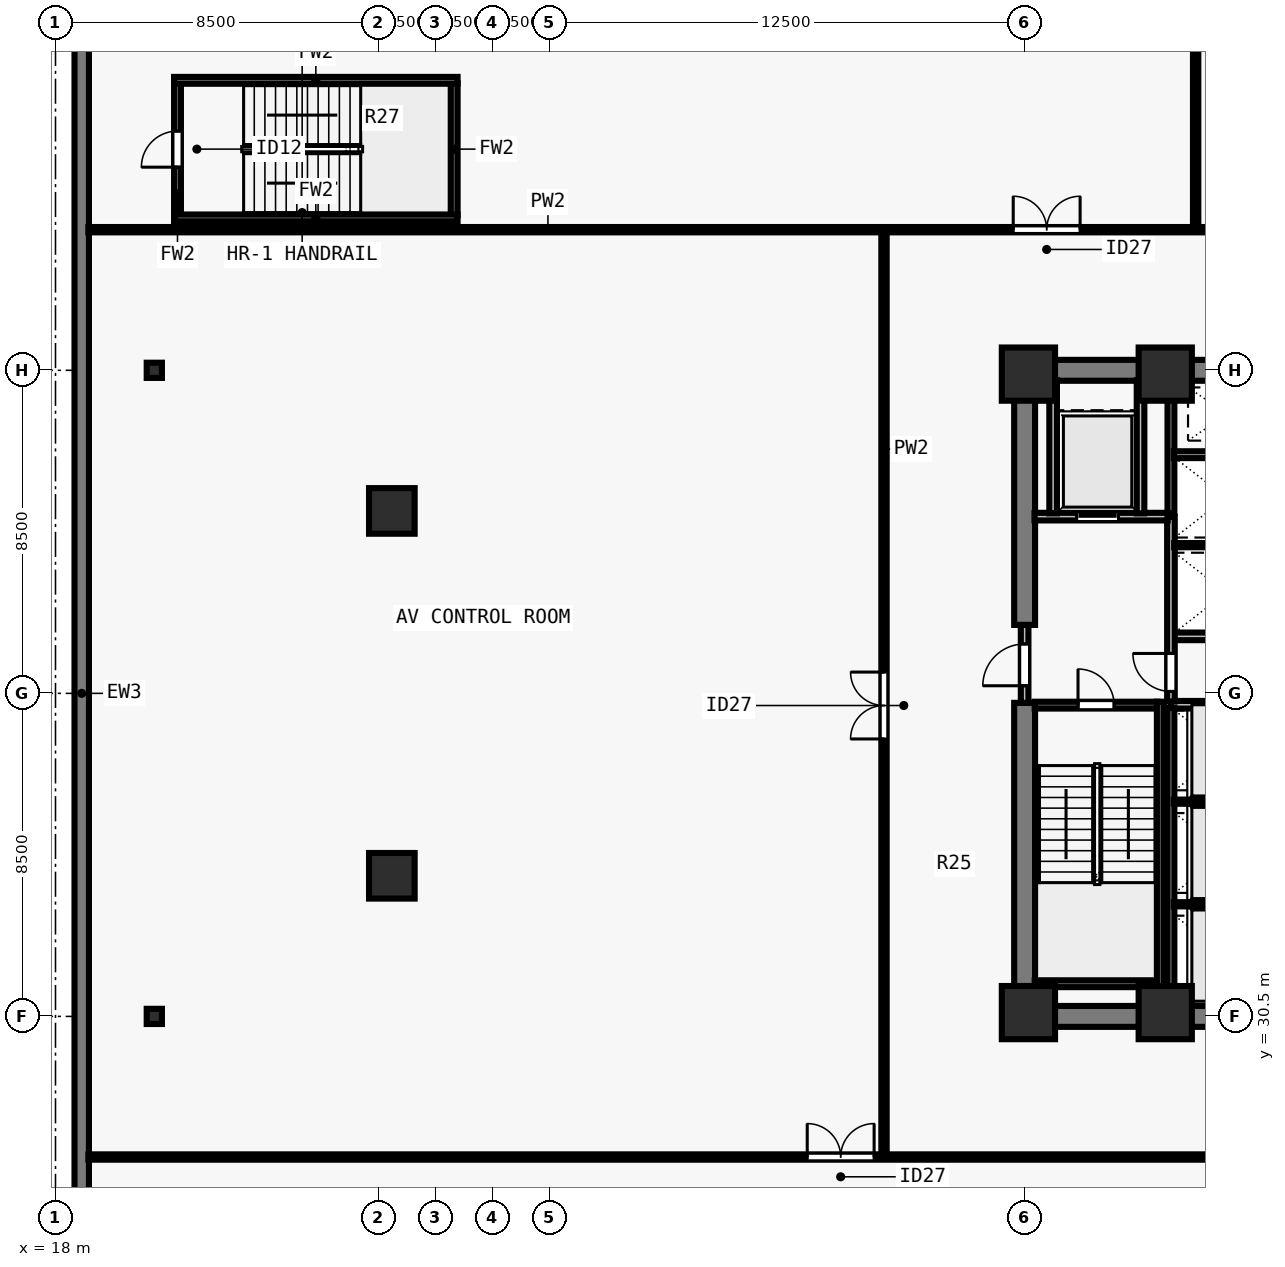
"""IFC4 building model, lengths in metres.
Left out: names, types, materials, properties, quantities, classifications, styles, units other than length and angle.
Written with IfcOpenShell. Run it as: python <this file> out.ifc"""

import sys

from ifc_helpers import new_model, si_unit, direction, frame, frame_2d, origin, origin_2d, place, context, subcontext, project, spatial, rectangle, i_section, extrude, element, fill, save


model = new_model("IFC4")
c1 = context("Model", 3, precision=1e-05, world=origin(), true_north=direction((0.0, 1.0)))
c2 = subcontext(c1, "Body", "Model", "MODEL_VIEW")
j1 = project(units=[si_unit("LENGTHUNIT", "METRE"), si_unit("PLANEANGLEUNIT", "RADIAN")], contexts=[c1])
p1 = place(None, origin())
s1 = spatial("IfcSite", under=j1, at=p1, CompositionType="ELEMENT")
p2 = place(p1, origin())
s2 = spatial("IfcBuilding", under=s1, at=p2, CompositionType="ELEMENT")
p3 = place(p2, frame((0.0, 0.0, 10.0)))
s3 = spatial("IfcBuildingStorey", under=s2, at=p3, CompositionType="ELEMENT", Elevation=10.0)
for number, where, z_axis, x_axis in (
    (1, (43.6, 30.6, 0.0), (0.0, 0.0, 1.0), (1.0, 0.0, 0.0)),
    (2, (47.2, 30.6, 0.0), (0.0, 0.0, 1.0), (1.0, 0.0, 0.0)),
    (3, (43.6, 47.4, 0.0), (0.0, 0.0, 1.0), (1.0, 0.0, 0.0)),
    (4, (47.2, 47.4, 0.0), (0.0, 0.0, 1.0), (1.0, 0.0, 0.0)),
):
    element("IfcColumn", number, at=place(p3, frame(where, z_axis=z_axis, x_axis=x_axis)), inside=s3, PredefinedType="COLUMN", context=c2, shape_type="SweptSolid", body=[
        extrude(rectangle(XDim=1.4, YDim=1.4, at=origin_2d()), origin(), (0.0, 0.0, 1.0), 4.5),
    ])
for number, where, z_axis, x_axis in (
    (5, (26.85, 43.8, 0.0), (0.0, 0.0, 1.0), (1.0, 0.0, 0.0)),
    (6, (26.85, 34.2, 0.0), (0.0, 0.0, 1.0), (1.0, 0.0, 0.0)),
):
    element("IfcColumn", number, at=place(p3, frame(where, z_axis=z_axis, x_axis=x_axis)), inside=s3, PredefinedType="COLUMN", context=c2, shape_type="SweptSolid", body=[
        extrude(rectangle(XDim=1.2, YDim=1.2, at=origin_2d()), origin(), (0.0, 0.0, 1.0), 4.5),
    ])
for number, where, z_axis, x_axis in (
    (7, (20.6, 30.5, 0.0), (0.0, 0.0, 1.0), (1.0, 0.0, 0.0)),
    (8, (20.6, 47.5, 0.0), (0.0, 0.0, 1.0), (1.0, 0.0, 0.0)),
):
    element("IfcColumn", number, at=place(p3, frame(where, z_axis=z_axis, x_axis=x_axis)), inside=s3, PredefinedType="COLUMN", context=c2, shape_type="SweptSolid", body=[
        extrude(i_section(OverallWidth=0.4, OverallDepth=0.4, WebThickness=0.028, FlangeThickness=0.045, at=origin_2d()), origin(), (0.0, 0.0, 1.0), 4.5),
    ])
p4 = place(p3, frame((18.69, 12.365, 0.0), z_axis=(0.0, 0.0, 1.0), x_axis=(0.0, 1.0, 0.0)))
e9 = element("IfcWall", 9, at=p4, inside=s3, PredefinedType="SOLIDWALL", context=c2, shape_type="SweptSolid", body=[
    extrude(rectangle(XDim=53.27, YDim=0.38, at=frame_2d((26.635, 0.0))), origin(), (0.0, 0.0, 1.0), 4.22),
])
for number, where, z_axis, x_axis in (
    (10, (43.225, 30.5, 0.0), (0.0, 0.0, 1.0), (1.0, 0.0, 0.0)),
    (11, (43.225, 47.5, 0.0), (0.0, 0.0, 1.0), (1.0, 0.0, 0.0)),
):
    element("IfcWall", number, at=place(p3, frame(where, z_axis=z_axis, x_axis=x_axis)), inside=s3, PredefinedType="SHEAR", context=c2, shape_type="SweptSolid", body=[
        extrude(rectangle(XDim=17.55, YDim=0.55, at=frame_2d((8.775, 0.0))), origin(), (0.0, 0.0, 1.0), 4.22),
    ])
p5 = place(p3, frame((43.5, 30.765, 0.0), z_axis=(0.0, 0.0, 1.0), x_axis=(0.0, 1.0, 0.0)))
e12 = element("IfcWall", 12, at=p5, inside=s3, PredefinedType="SHEAR", context=c2, shape_type="SweptSolid", body=[
    extrude(rectangle(XDim=7.985, YDim=0.55, at=frame_2d((3.993, 0.0))), origin(), (0.0, 0.0, 1.0), 4.22),
])
p6 = place(p3, frame((43.5, 40.8, 0.0), z_axis=(0.0, 0.0, 1.0), x_axis=(0.0, 1.0, 0.0)))
e13 = element("IfcWall", 13, at=p6, inside=s3, PredefinedType="SHEAR", context=c2, shape_type="SweptSolid", body=[
    extrude(rectangle(XDim=6.435, YDim=0.55, at=frame_2d((3.218, 0.0))), origin(), (0.0, 0.0, 1.0), 4.22),
])
for number, where, z_axis, x_axis in (
    (14, (47.35, 38.7, 0.0), (0.0, 0.0, 1.0), (1.0, 0.0, 0.0)),
    (15, (47.35, 40.5, 0.0), (0.0, 0.0, 1.0), (1.0, 0.0, 0.0)),
):
    element("IfcWall", number, at=place(p3, frame(where, z_axis=z_axis, x_axis=x_axis)), inside=s3, PredefinedType="SOLIDWALL", context=c2, shape_type="SweptSolid", body=[
        extrude(rectangle(XDim=2.95, YDim=0.2, at=frame_2d((1.475, 0.0))), origin(), (0.0, 0.0, 1.0), 4.22),
    ])
p7 = place(p3, frame((43.5, 38.75, 0.0), z_axis=(0.0, 0.0, 1.0), x_axis=(0.0, 1.0, 0.0)))
e16 = element("IfcWall", 16, at=p7, inside=s3, PredefinedType="SOLIDWALL", context=c2, shape_type="SweptSolid", body=[
    extrude(rectangle(XDim=2.05, YDim=0.2, at=frame_2d((1.025, 0.0))), origin(), (0.0, 0.0, 1.0), 4.22),
])
p8 = place(p7, frame((0.45, 0.0, 0.0)))
e17 = element("IfcOpeningElement", 17, at=p8, cuts=e16, PredefinedType="OPENING", context=c2, shape_type="SweptSolid", body=[
    extrude(rectangle(XDim=1.1, YDim=2.15, at=frame_2d((0.55, 1.075))), frame((0.0, 0.11, 0.0), z_axis=(0.0, -1.0, 0.0), x_axis=(1.0, 0.0, 0.0)), (0.0, 0.0, 1.0), 0.22),
])
p9 = place(p3, frame((47.35, 38.785, 0.0), z_axis=(0.0, 0.0, 1.0), x_axis=(0.0, 1.0, 0.0)))
e18 = element("IfcWall", 18, at=p9, inside=s3, PredefinedType="SOLIDWALL", context=c2, shape_type="SweptSolid", body=[
    extrude(rectangle(XDim=4.865, YDim=0.2, at=frame_2d((2.433, 0.0))), origin(), (0.0, 0.0, 1.0), 4.22),
])
p10 = place(p9, frame((0.265, 0.0, 0.0)))
e19 = element("IfcOpeningElement", 19, at=p10, cuts=e18, PredefinedType="OPENING", context=c2, shape_type="SweptSolid", body=[
    extrude(rectangle(XDim=1.0, YDim=2.15, at=frame_2d((0.5, 1.075))), frame((0.0, 0.11, 0.0), z_axis=(0.0, -1.0, 0.0), x_axis=(1.0, 0.0, 0.0)), (0.0, 0.0, 1.0), 0.22),
])
p11 = place(p3, frame((43.76, 43.65, 0.0), z_axis=(0.0, 0.0, 1.0), x_axis=(1.0, 0.0, 0.0)))
e20 = element("IfcWall", 20, at=p11, inside=s3, PredefinedType="SOLIDWALL", context=c2, shape_type="SweptSolid", body=[
    extrude(rectangle(XDim=3.505, YDim=0.2, at=frame_2d((1.752, 0.0))), origin(), (0.0, 0.0, 1.0), 4.22),
])
p12 = place(p11, frame((1.11, 0.0, 0.0)))
e21 = element("IfcOpeningElement", 21, at=p12, cuts=e20, PredefinedType="OPENING", context=c2, shape_type="SweptSolid", body=[
    extrude(rectangle(XDim=1.1, YDim=2.2, at=frame_2d((0.55, 1.1))), frame((0.0, 0.11, 0.0), z_axis=(0.0, -1.0, 0.0), x_axis=(1.0, 0.0, 0.0)), (0.0, 0.0, 1.0), 0.22),
])
for number, where, z_axis, x_axis in (
    (22, (46.55, 43.735, 0.0), (0.0, 0.0, 1.0), (0.0, 1.0, 0.0)),
    (23, (44.25, 43.735, 0.0), (0.0, 0.0, 1.0), (0.0, 1.0, 0.0)),
):
    element("IfcWall", number, at=place(p3, frame(where, z_axis=z_axis, x_axis=x_axis)), inside=s3, PredefinedType="SOLIDWALL", context=c2, shape_type="SweptSolid", body=[
        extrude(rectangle(XDim=3.505, YDim=0.2, at=frame_2d((1.752, 0.0))), origin(), (0.0, 0.0, 1.0), 4.22),
    ])
p13 = place(p3, frame((47.35, 30.76, 0.0), z_axis=(0.0, 0.0, 1.0), x_axis=(0.0, 1.0, 0.0)))
e24 = element("IfcWall", 24, at=p13, inside=s3, PredefinedType="SOLIDWALL", context=c2, shape_type="SweptSolid", body=[
    extrude(rectangle(XDim=7.855, YDim=0.18, at=frame_2d((3.927, 0.0))), origin(), (0.0, 0.0, 1.0), 4.22),
])
for number, where, z_axis, x_axis in (
    (25, (47.425, 33.45, 0.0), (0.0, 0.0, 1.0), (1.0, 0.0, 0.0)),
    (26, (47.425, 36.15, 0.0), (0.0, 0.0, 1.0), (1.0, 0.0, 0.0)),
):
    element("IfcWall", number, at=place(p3, frame(where, z_axis=z_axis, x_axis=x_axis)), inside=s3, PredefinedType="PARTITIONING", context=c2, shape_type="SweptSolid", body=[
        extrude(rectangle(XDim=2.79, YDim=0.11, at=frame_2d((1.395, 0.0))), origin(), (0.0, 0.0, 1.0), 4.22),
    ])
p14 = place(p3, frame((47.35, 43.735, 0.0), z_axis=(0.0, 0.0, 1.0), x_axis=(0.0, 1.0, 0.0)))
e27 = element("IfcWall", 27, at=p14, inside=s3, PredefinedType="SOLIDWALL", context=c2, shape_type="SweptSolid", body=[
    extrude(rectangle(XDim=3.505, YDim=0.18, at=frame_2d((1.752, 0.0))), origin(), (0.0, 0.0, 1.0), 4.22),
])
p15 = place(p3, frame((47.435, 42.9, 0.0), z_axis=(0.0, 0.0, 1.0), x_axis=(1.0, 0.0, 0.0)))
e28 = element("IfcWall", 28, at=p15, inside=s3, PredefinedType="PARTITIONING", context=c2, shape_type="SweptSolid", body=[
    extrude(rectangle(XDim=2.78, YDim=0.11, at=frame_2d((1.39, 0.0))), origin(), (0.0, 0.0, 1.0), 4.22),
])
p16 = place(p3, frame((47.425, 45.28, 0.0), z_axis=(0.0, 0.0, 1.0), x_axis=(1.0, 0.0, 0.0)))
e29 = element("IfcWall", 29, at=p16, inside=s3, PredefinedType="SOLIDWALL", context=c2, shape_type="SweptSolid", body=[
    extrude(rectangle(XDim=2.79, YDim=0.18, at=frame_2d((1.395, 0.0))), origin(), (0.0, 0.0, 1.0), 4.22),
])
p17 = place(p3, frame((18.865, 26.8, 0.0), z_axis=(0.0, 0.0, 1.0), x_axis=(1.0, 0.0, 0.0)))
e30 = element("IfcWall", 30, at=p17, inside=s3, PredefinedType="PARTITIONING", context=c2, shape_type="SweptSolid", body=[
    extrude(rectangle(XDim=66.27, YDim=0.14, at=frame_2d((33.135, 0.0))), origin(), (0.0, 0.0, 1.0), 3.738),
])
p18 = place(p17, frame((18.915, 0.0, 0.0)))
e31 = element("IfcOpeningElement", 31, at=p18, cuts=e30, PredefinedType="OPENING", context=c2, shape_type="SweptSolid", body=[
    extrude(rectangle(XDim=1.76, YDim=2.2, at=frame_2d((0.88, 1.1))), frame((0.0, 0.08, 0.0), z_axis=(0.0, -1.0, 0.0), x_axis=(1.0, 0.0, 0.0)), (0.0, 0.0, 1.0), 0.16),
])
p19 = place(p17, frame((41.135, 0.0, 0.0)))
e32 = element("IfcOpeningElement", 32, at=p19, cuts=e30, PredefinedType="OPENING", context=c2, shape_type="SweptSolid", body=[
    extrude(rectangle(XDim=1.76, YDim=2.2, at=frame_2d((0.88, 1.1))), frame((0.0, 0.08, 0.0), z_axis=(0.0, -1.0, 0.0), x_axis=(1.0, 0.0, 0.0)), (0.0, 0.0, 1.0), 0.16),
])
p20 = place(p3, frame((18.865, 51.2, 0.0), z_axis=(0.0, 0.0, 1.0), x_axis=(1.0, 0.0, 0.0)))
e33 = element("IfcWall", 33, at=p20, inside=s3, PredefinedType="PARTITIONING", context=c2, shape_type="SweptSolid", body=[
    extrude(rectangle(XDim=66.27, YDim=0.14, at=frame_2d((33.135, 0.0))), origin(), (0.0, 0.0, 1.0), 3.738),
])
p21 = place(p20, frame((24.335, 0.0, 0.0)))
e34 = element("IfcOpeningElement", 34, at=p21, cuts=e33, PredefinedType="OPENING", context=c2, shape_type="SweptSolid", body=[
    extrude(rectangle(XDim=1.76, YDim=2.2, at=frame_2d((0.88, 1.1))), frame((0.0, 0.08, 0.0), z_axis=(0.0, -1.0, 0.0), x_axis=(1.0, 0.0, 0.0)), (0.0, 0.0, 1.0), 0.16),
])
p22 = place(p20, frame((37.135, 0.0, 0.0)))
e35 = element("IfcOpeningElement", 35, at=p22, cuts=e33, PredefinedType="OPENING", context=c2, shape_type="SweptSolid", body=[
    extrude(rectangle(XDim=1.76, YDim=2.2, at=frame_2d((0.88, 1.1))), frame((0.0, 0.08, 0.0), z_axis=(0.0, -1.0, 0.0), x_axis=(1.0, 0.0, 0.0)), (0.0, 0.0, 1.0), 0.16),
])
p23 = place(p20, frame((51.135, 0.0, 0.0)))
e36 = element("IfcOpeningElement", 36, at=p23, cuts=e33, PredefinedType="OPENING", context=c2, shape_type="SweptSolid", body=[
    extrude(rectangle(XDim=0.95, YDim=2.1, at=frame_2d((0.475, 1.05))), frame((0.0, 0.08, 0.0), z_axis=(0.0, -1.0, 0.0), x_axis=(1.0, 0.0, 0.0)), (0.0, 0.0, 1.0), 0.16),
])
p24 = place(p20, frame((55.335, 0.0, 0.0)))
e37 = element("IfcOpeningElement", 37, at=p24, cuts=e33, PredefinedType="OPENING", context=c2, shape_type="SweptSolid", body=[
    extrude(rectangle(XDim=1.76, YDim=2.2, at=frame_2d((0.88, 1.1))), frame((0.0, 0.08, 0.0), z_axis=(0.0, -1.0, 0.0), x_axis=(1.0, 0.0, 0.0)), (0.0, 0.0, 1.0), 0.16),
])
p25 = place(p3, frame((39.8, 26.855, 0.0), z_axis=(0.0, 0.0, 1.0), x_axis=(0.0, 1.0, 0.0)))
e38 = element("IfcWall", 38, at=p25, inside=s3, PredefinedType="PARTITIONING", context=c2, shape_type="SweptSolid", body=[
    extrude(rectangle(XDim=24.29, YDim=0.14, at=frame_2d((12.145, 0.0))), origin(), (0.0, 0.0, 1.0), 4.22),
])
p26 = place(p25, frame((10.945, 0.0, 0.0)))
e39 = element("IfcOpeningElement", 39, at=p26, cuts=e38, PredefinedType="OPENING", context=c2, shape_type="SweptSolid", body=[
    extrude(rectangle(XDim=1.76, YDim=2.2, at=frame_2d((0.88, 1.1))), frame((0.0, 0.08, 0.0), z_axis=(0.0, -1.0, 0.0), x_axis=(1.0, 0.0, 0.0)), (0.0, 0.0, 1.0), 0.16),
])
p27 = place(p3, frame((48.0, 51.3, 0.0), z_axis=(0.0, 0.0, 1.0), x_axis=(0.0, 1.0, 0.0)))
e40 = element("IfcWall", 40, at=p27, inside=s3, PredefinedType="PARTITIONING", context=c2, shape_type="SweptSolid", body=[
    extrude(rectangle(XDim=14.335, YDim=0.14, at=frame_2d((7.167, 0.0))), origin(), (0.0, 0.0, 1.0), 4.22),
])
p28 = place(p3, frame((43.765, 38.69, 0.0), z_axis=(0.0, 0.0, 1.0), x_axis=(1.0, 0.0, 0.0)))
e41 = element("IfcWall", 41, at=p28, inside=s3, PredefinedType="SOLIDWALL", context=c2, shape_type="SweptSolid", body=[
    extrude(rectangle(XDim=3.23, YDim=0.18, at=frame_2d((1.615, 0.0))), origin(), (0.0, 0.0, 1.0), 4.22),
])
p29 = place(p28, frame((1.14, 0.0, 0.0)))
e42 = element("IfcOpeningElement", 42, at=p29, cuts=e41, PredefinedType="OPENING", context=c2, shape_type="SweptSolid", body=[
    extrude(rectangle(XDim=0.95, YDim=2.15, at=frame_2d((0.475, 1.075))), frame((0.0, 0.1, 0.0), z_axis=(0.0, -1.0, 0.0), x_axis=(1.0, 0.0, 0.0)), (0.0, 0.0, 1.0), 0.2),
])
p30 = place(p3, frame((43.765, 31.36, 0.0), z_axis=(0.0, 0.0, 1.0), x_axis=(1.0, 0.0, 0.0)))
e43 = element("IfcWall", 43, at=p30, inside=s3, PredefinedType="SOLIDWALL", context=c2, shape_type="SweptSolid", body=[
    extrude(rectangle(XDim=3.23, YDim=0.18, at=frame_2d((1.615, 0.0))), origin(), (0.0, 0.0, 1.0), 4.22),
])
p31 = place(p3, frame((47.07, 38.78, 0.0), z_axis=(0.0, 0.0, 1.0), x_axis=(0.0, -1.0, 0.0)))
e44 = element("IfcWall", 44, at=p31, inside=s3, PredefinedType="SOLIDWALL", context=c2, shape_type="SweptSolid", body=[
    extrude(rectangle(XDim=8.017, YDim=0.18, at=frame_2d((4.009, 0.0))), origin(), (0.0, 0.0, 1.0), 4.22),
])
p32 = place(p3, frame((21.21, 51.585, 0.0), z_axis=(0.0, 0.0, 1.0), x_axis=(0.0, 1.0, 0.0)))
e45 = element("IfcWall", 45, at=p32, inside=s3, PredefinedType="SOLIDWALL", context=c2, shape_type="SweptSolid", body=[
    extrude(rectangle(XDim=3.47, YDim=0.18, at=frame_2d((1.735, 0.0))), origin(), (0.0, 0.0, 1.0), 4.22),
])
p33 = place(p32, frame((1.26, 0.0, 0.0)))
e46 = element("IfcOpeningElement", 46, at=p33, cuts=e45, PredefinedType="OPENING", context=c2, shape_type="SweptSolid", body=[
    extrude(rectangle(XDim=0.95, YDim=2.15, at=frame_2d((0.475, 1.075))), frame((0.0, 0.1, 0.0), z_axis=(0.0, -1.0, 0.0), x_axis=(1.0, 0.0, 0.0)), (0.0, 0.0, 1.0), 0.2),
])
p34 = place(p3, frame((28.49, 51.585, 0.0), z_axis=(0.0, 0.0, 1.0), x_axis=(0.0, 1.0, 0.0)))
e47 = element("IfcWall", 47, at=p34, inside=s3, PredefinedType="SOLIDWALL", context=c2, shape_type="SweptSolid", body=[
    extrude(rectangle(XDim=3.47, YDim=0.18, at=frame_2d((1.735, 0.0))), origin(), (0.0, 0.0, 1.0), 4.22),
])
for number, where, z_axis, x_axis in (
    (48, (21.12, 51.51, 0.0), (0.0, 0.0, 1.0), (1.0, 0.0, 0.0)),
    (49, (21.12, 55.13, 0.0), (0.0, 0.0, 1.0), (1.0, 0.0, 0.0)),
):
    element("IfcWall", number, at=place(p3, frame(where, z_axis=z_axis, x_axis=x_axis)), inside=s3, PredefinedType="SOLIDWALL", context=c2, shape_type="SweptSolid", body=[
        extrude(rectangle(XDim=7.46, YDim=0.18, at=frame_2d((3.73, 0.0))), origin(), (0.0, 0.0, 1.0), 4.22),
    ])
p35 = place(p8, origin())
e50 = element("IfcDoor", 50, at=p35, inside=s3, OperationType="SINGLE_SWING_LEFT", PredefinedType="DOOR", context=c2, shape_type="SweptSolid", body=[
    extrude(rectangle(XDim=1.1, YDim=2.15, at=frame_2d((0.55, 1.075))), frame((0.0, 0.025, 0.0), z_axis=(0.0, -1.0, 0.0), x_axis=(1.0, 0.0, 0.0)), (0.0, 0.0, 1.0), 0.05),
])
fill(e17, e50)
p36 = place(p10, origin())
e51 = element("IfcDoor", 51, at=p36, inside=s3, OperationType="SINGLE_SWING_RIGHT", PredefinedType="DOOR", context=c2, shape_type="SweptSolid", body=[
    extrude(rectangle(XDim=1.0, YDim=2.15, at=frame_2d((0.5, 1.075))), frame((0.0, 0.025, 0.0), z_axis=(0.0, -1.0, 0.0), x_axis=(1.0, 0.0, 0.0)), (0.0, 0.0, 1.0), 0.05),
])
fill(e19, e51)
p37 = place(p12, origin())
e52 = element("IfcDoor", 52, at=p37, inside=s3, OperationType="SLIDING_TO_LEFT", PredefinedType="DOOR", context=c2, shape_type="SweptSolid", body=[
    extrude(rectangle(XDim=1.1, YDim=2.2, at=frame_2d((0.55, 1.1))), frame((0.0, 0.025, 0.0), z_axis=(0.0, -1.0, 0.0), x_axis=(1.0, 0.0, 0.0)), (0.0, 0.0, 1.0), 0.05),
])
fill(e21, e52)
p38 = place(p18, origin())
e53 = element("IfcDoor", 53, at=p38, inside=s3, OperationType="DOUBLE_DOOR_SINGLE_SWING", PredefinedType="DOOR", context=c2, shape_type="SweptSolid", body=[
    extrude(rectangle(XDim=1.76, YDim=2.2, at=frame_2d((0.88, 1.1))), frame((0.0, 0.025, 0.0), z_axis=(0.0, -1.0, 0.0), x_axis=(1.0, 0.0, 0.0)), (0.0, 0.0, 1.0), 0.05),
])
fill(e31, e53)
p39 = place(p21, origin())
e54 = element("IfcDoor", 54, at=p39, inside=s3, OperationType="DOUBLE_DOOR_SINGLE_SWING", PredefinedType="DOOR", context=c2, shape_type="SweptSolid", body=[
    extrude(rectangle(XDim=1.76, YDim=2.2, at=frame_2d((0.88, 1.1))), frame((0.0, 0.025, 0.0), z_axis=(0.0, -1.0, 0.0), x_axis=(1.0, 0.0, 0.0)), (0.0, 0.0, 1.0), 0.05),
])
fill(e34, e54)
p40 = place(p26, origin())
e55 = element("IfcDoor", 55, at=p40, inside=s3, OperationType="DOUBLE_DOOR_SINGLE_SWING", PredefinedType="DOOR", context=c2, shape_type="SweptSolid", body=[
    extrude(rectangle(XDim=1.76, YDim=2.2, at=frame_2d((0.88, 1.1))), frame((0.0, 0.025, 0.0), z_axis=(0.0, -1.0, 0.0), x_axis=(1.0, 0.0, 0.0)), (0.0, 0.0, 1.0), 0.05),
])
fill(e39, e55)
p41 = place(p29, origin())
e56 = element("IfcDoor", 56, at=p41, inside=s3, OperationType="SINGLE_SWING_LEFT", PredefinedType="DOOR", context=c2, shape_type="SweptSolid", body=[
    extrude(rectangle(XDim=0.95, YDim=2.15, at=frame_2d((0.475, 1.075))), frame((0.0, 0.025, 0.0), z_axis=(0.0, -1.0, 0.0), x_axis=(1.0, 0.0, 0.0)), (0.0, 0.0, 1.0), 0.05),
])
fill(e42, e56)
p42 = place(p33, origin())
e57 = element("IfcDoor", 57, at=p42, inside=s3, OperationType="SINGLE_SWING_LEFT", PredefinedType="DOOR", context=c2, shape_type="SweptSolid", body=[
    extrude(rectangle(XDim=0.95, YDim=2.15, at=frame_2d((0.475, 1.075))), frame((0.0, 0.025, 0.0), z_axis=(0.0, -1.0, 0.0), x_axis=(1.0, 0.0, 0.0)), (0.0, 0.0, 1.0), 0.05),
])
fill(e46, e57)
save(model, sys.argv[1])
